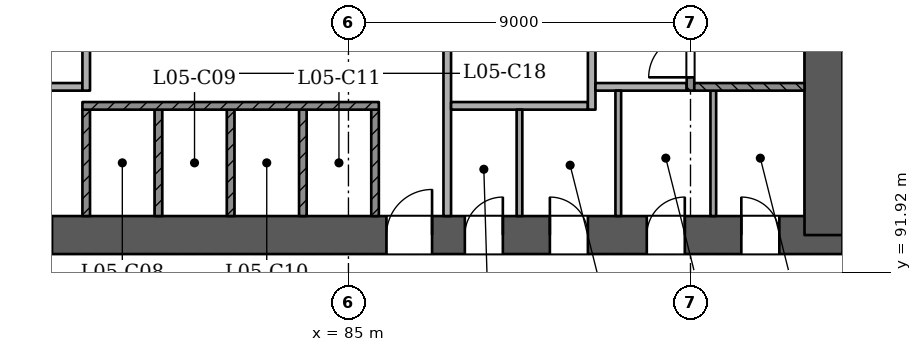
"""IFC4 building model, lengths in metres.
Left out: names, types, materials, properties, quantities, classifications, styles, units other than length and angle.
Written with IfcOpenShell. Run it as: python <this file> out.ifc"""

import sys

from ifc_helpers import new_model, si_unit, direction, frame, frame_2d, origin, place, context, subcontext, project, spatial, rectangle, extrude, element, fill, save


model = new_model("IFC4")
c1 = context("Model", 3, precision=1e-05, world=origin(), true_north=direction((0.0, 1.0)))
c2 = subcontext(c1, "Body", "Model", "MODEL_VIEW")
j1 = project(units=[si_unit("LENGTHUNIT", "METRE"), si_unit("PLANEANGLEUNIT", "RADIAN")], contexts=[c1])
p1 = place(None, origin())
s1 = spatial("IfcSite", under=j1, at=p1, CompositionType="ELEMENT")
p2 = place(p1, origin())
s2 = spatial("IfcBuilding", under=s1, at=p2, CompositionType="ELEMENT")
p3 = place(p2, frame((0.0, 0.0, 27.0)))
s3 = spatial("IfcBuildingStorey", under=s2, at=p3, CompositionType="ELEMENT", Elevation=27.0)
p4 = place(p3, frame((72.5, 92.9, 0.0), z_axis=(0.0, 0.0, 1.0), x_axis=(1.0, 0.0, 0.0)))
e1 = element("IfcWall", 1, at=p4, inside=s3, PredefinedType="SHEAR", context=c2, shape_type="SweptSolid", body=[
    extrude(rectangle(XDim=25.5, YDim=1.0, at=frame_2d((12.75, 0.0))), origin(), (0.0, 0.0, 1.0), 3.6),
])
p5 = place(p4, frame((1.3, 0.0, 0.0)))
e2 = element("IfcOpeningElement", 2, at=p5, cuts=e1, PredefinedType="OPENING", context=c2, shape_type="SweptSolid", body=[
    extrude(rectangle(XDim=1.2, YDim=2.1, at=frame_2d((0.6, 1.05))), frame((0.0, 0.51, 0.0), z_axis=(0.0, -1.0, 0.0), x_axis=(1.0, 0.0, 0.0)), (0.0, 0.0, 1.0), 1.021),
])
p6 = place(p4, frame((3.5, 0.0, 0.0)))
e3 = element("IfcOpeningElement", 3, at=p6, cuts=e1, PredefinedType="OPENING", context=c2, shape_type="SweptSolid", body=[
    extrude(rectangle(XDim=1.2, YDim=2.1, at=frame_2d((0.6, 1.05))), frame((0.0, 0.51, 0.0), z_axis=(0.0, -1.0, 0.0), x_axis=(1.0, 0.0, 0.0)), (0.0, 0.0, 1.0), 1.021),
])
p7 = place(p4, frame((13.5, 0.0, 0.0)))
e4 = element("IfcOpeningElement", 4, at=p7, cuts=e1, PredefinedType="OPENING", context=c2, shape_type="SweptSolid", body=[
    extrude(rectangle(XDim=1.2, YDim=2.1, at=frame_2d((0.6, 1.05))), frame((0.0, 0.51, 0.0), z_axis=(0.0, -1.0, 0.0), x_axis=(1.0, 0.0, 0.0)), (0.0, 0.0, 1.0), 1.021),
])
p8 = place(p4, frame((15.562, 0.0, 0.0)))
e5 = element("IfcOpeningElement", 5, at=p8, cuts=e1, PredefinedType="OPENING", context=c2, shape_type="SweptSolid", body=[
    extrude(rectangle(XDim=1.0, YDim=2.1, at=frame_2d((0.5, 1.05))), frame((0.0, 0.51, 0.0), z_axis=(0.0, -1.0, 0.0), x_axis=(1.0, 0.0, 0.0)), (0.0, 0.0, 1.0), 1.021),
])
p9 = place(p4, frame((17.8, 0.0, 0.0)))
e6 = element("IfcOpeningElement", 6, at=p9, cuts=e1, PredefinedType="OPENING", context=c2, shape_type="SweptSolid", body=[
    extrude(rectangle(XDim=1.0, YDim=2.1, at=frame_2d((0.5, 1.05))), frame((0.0, 0.51, 0.0), z_axis=(0.0, -1.0, 0.0), x_axis=(1.0, 0.0, 0.0)), (0.0, 0.0, 1.0), 1.021),
])
p10 = place(p4, frame((20.35, 0.0, 0.0)))
e7 = element("IfcOpeningElement", 7, at=p10, cuts=e1, PredefinedType="OPENING", context=c2, shape_type="SweptSolid", body=[
    extrude(rectangle(XDim=1.0, YDim=2.1, at=frame_2d((0.5, 1.05))), frame((0.0, 0.51, 0.0), z_axis=(0.0, -1.0, 0.0), x_axis=(1.0, 0.0, 0.0)), (0.0, 0.0, 1.0), 1.021),
])
p11 = place(p4, frame((22.837, 0.0, 0.0)))
e8 = element("IfcOpeningElement", 8, at=p11, cuts=e1, PredefinedType="OPENING", context=c2, shape_type="SweptSolid", body=[
    extrude(rectangle(XDim=1.0, YDim=2.1, at=frame_2d((0.5, 1.05))), frame((0.0, 0.51, 0.0), z_axis=(0.0, -1.0, 0.0), x_axis=(1.0, 0.0, 0.0)), (0.0, 0.0, 1.0), 1.021),
])
p12 = place(p3, frame((97.5, 92.9, 0.0), z_axis=(0.0, 0.0, 1.0), x_axis=(0.0, 1.0, 0.0)))
e9 = element("IfcWall", 9, at=p12, inside=s3, PredefinedType="SHEAR", context=c2, shape_type="SweptSolid", body=[
    extrude(rectangle(XDim=11.5, YDim=1.0, at=frame_2d((5.75, 0.0))), origin(), (0.0, 0.0, 1.0), 3.6),
])
p13 = place(p3, frame((61.193, 96.236, 0.0), z_axis=(0.0, 0.0, 1.0), x_axis=(0.49999953585, -0.866025671762, 0.0)))
e10 = element("IfcWall", 10, at=p13, inside=s3, PredefinedType="PARTITIONING", context=c2, shape_type="SweptSolid", body=[
    extrude(rectangle(XDim=45.0, YDim=0.15, at=frame_2d((22.5, 0.0))), origin(), (0.0, 0.0, 1.0), 2.7),
])
p14 = place(p13, frame((1.75, 0.0, 0.0)))
e11 = element("IfcOpeningElement", 11, at=p14, cuts=e10, PredefinedType="OPENING", context=c2, shape_type="SweptSolid", body=[
    extrude(rectangle(XDim=1.0, YDim=2.1, at=frame_2d((0.5, 1.05))), frame((0.0, 0.085, 0.0), z_axis=(0.0, -1.0, 0.0), x_axis=(1.0, 0.0, 0.0)), (0.0, 0.0, 1.0), 0.171),
])
p15 = place(p13, frame((7.3, 0.0, 0.0)))
e12 = element("IfcOpeningElement", 12, at=p15, cuts=e10, PredefinedType="OPENING", context=c2, shape_type="SweptSolid", body=[
    extrude(rectangle(XDim=1.2, YDim=2.1, at=frame_2d((0.6, 1.05))), frame((0.0, 0.085, 0.0), z_axis=(0.0, -1.0, 0.0), x_axis=(1.0, 0.0, 0.0)), (0.0, 0.0, 1.0), 0.171),
])
p16 = place(p13, frame((14.071, 0.0, 0.0)))
e13 = element("IfcOpeningElement", 13, at=p16, cuts=e10, PredefinedType="OPENING", context=c2, shape_type="SweptSolid", body=[
    extrude(rectangle(XDim=1.1, YDim=2.1, at=frame_2d((0.55, 1.05))), frame((0.0, 0.085, 0.0), z_axis=(0.0, -1.0, 0.0), x_axis=(1.0, 0.0, 0.0)), (0.0, 0.0, 1.0), 0.171),
])
p17 = place(p13, frame((20.78, 0.0, 0.0)))
e14 = element("IfcOpeningElement", 14, at=p17, cuts=e10, PredefinedType="OPENING", context=c2, shape_type="SweptSolid", body=[
    extrude(rectangle(XDim=1.0, YDim=2.1, at=frame_2d((0.5, 1.05))), frame((0.0, 0.085, 0.0), z_axis=(0.0, -1.0, 0.0), x_axis=(1.0, 0.0, 0.0)), (0.0, 0.0, 1.0), 0.171),
])
p18 = place(p13, frame((23.105, 0.0, 0.0)))
e15 = element("IfcOpeningElement", 15, at=p18, cuts=e10, PredefinedType="OPENING", context=c2, shape_type="SweptSolid", body=[
    extrude(rectangle(XDim=1.0, YDim=2.1, at=frame_2d((0.5, 1.05))), frame((0.0, 0.085, 0.0), z_axis=(0.0, -1.0, 0.0), x_axis=(1.0, 0.0, 0.0)), (0.0, 0.0, 1.0), 0.171),
])
p19 = place(p13, frame((28.75, 0.0, 0.0)))
e16 = element("IfcOpeningElement", 16, at=p19, cuts=e10, PredefinedType="OPENING", context=c2, shape_type="SweptSolid", body=[
    extrude(rectangle(XDim=1.0, YDim=2.1, at=frame_2d((0.5, 1.05))), frame((0.0, 0.085, 0.0), z_axis=(0.0, -1.0, 0.0), x_axis=(1.0, 0.0, 0.0)), (0.0, 0.0, 1.0), 0.171),
])
p20 = place(p13, frame((34.3, 0.0, 0.0)))
e17 = element("IfcOpeningElement", 17, at=p20, cuts=e10, PredefinedType="OPENING", context=c2, shape_type="SweptSolid", body=[
    extrude(rectangle(XDim=1.2, YDim=2.1, at=frame_2d((0.6, 1.05))), frame((0.0, 0.085, 0.0), z_axis=(0.0, -1.0, 0.0), x_axis=(1.0, 0.0, 0.0)), (0.0, 0.0, 1.0), 0.171),
])
p21 = place(p13, frame((43.28, 0.0, 0.0)))
e18 = element("IfcOpeningElement", 18, at=p21, cuts=e10, PredefinedType="OPENING", context=c2, shape_type="SweptSolid", body=[
    extrude(rectangle(XDim=1.0, YDim=2.1, at=frame_2d((0.5, 1.05))), frame((0.0, 0.085, 0.0), z_axis=(0.0, -1.0, 0.0), x_axis=(1.0, 0.0, 0.0)), (0.0, 0.0, 1.0), 0.171),
])
p22 = place(p3, frame((86.307, 57.264, 0.0), z_axis=(0.0, 0.0, 1.0), x_axis=(0.500000579958, 0.866025068945, 0.0)))
e19 = element("IfcWall", 19, at=p22, inside=s3, PredefinedType="PARTITIONING", context=c2, shape_type="SweptSolid", body=[
    extrude(rectangle(XDim=40.5, YDim=0.15, at=frame_2d((20.25, 0.0))), origin(), (0.0, 0.0, 1.0), 2.7),
])
p23 = place(p22, frame((0.72, 0.0, 0.0)))
e20 = element("IfcOpeningElement", 20, at=p23, cuts=e19, PredefinedType="OPENING", context=c2, shape_type="SweptSolid", body=[
    extrude(rectangle(XDim=1.0, YDim=2.1, at=frame_2d((0.5, 1.05))), frame((0.0, 0.085, 0.0), z_axis=(0.0, -1.0, 0.0), x_axis=(1.0, 0.0, 0.0)), (0.0, 0.0, 1.0), 0.171),
])
p24 = place(p22, frame((5.22, 0.0, 0.0)))
e21 = element("IfcOpeningElement", 21, at=p24, cuts=e19, PredefinedType="OPENING", context=c2, shape_type="SweptSolid", body=[
    extrude(rectangle(XDim=1.0, YDim=2.1, at=frame_2d((0.5, 1.05))), frame((0.0, 0.085, 0.0), z_axis=(0.0, -1.0, 0.0), x_axis=(1.0, 0.0, 0.0)), (0.0, 0.0, 1.0), 0.171),
])
p25 = place(p22, frame((11.78, 0.0, 0.0)))
e22 = element("IfcOpeningElement", 22, at=p25, cuts=e19, PredefinedType="OPENING", context=c2, shape_type="SweptSolid", body=[
    extrude(rectangle(XDim=1.0, YDim=2.1, at=frame_2d((0.5, 1.05))), frame((0.0, 0.085, 0.0), z_axis=(0.0, -1.0, 0.0), x_axis=(1.0, 0.0, 0.0)), (0.0, 0.0, 1.0), 0.171),
])
p26 = place(p22, frame((14.22, 0.0, 0.0)))
e23 = element("IfcOpeningElement", 23, at=p26, cuts=e19, PredefinedType="OPENING", context=c2, shape_type="SweptSolid", body=[
    extrude(rectangle(XDim=1.0, YDim=2.1, at=frame_2d((0.5, 1.05))), frame((0.0, 0.085, 0.0), z_axis=(0.0, -1.0, 0.0), x_axis=(1.0, 0.0, 0.0)), (0.0, 0.0, 1.0), 0.171),
])
p27 = place(p22, frame((19.75, 0.0, 0.0)))
e24 = element("IfcOpeningElement", 24, at=p27, cuts=e19, PredefinedType="OPENING", context=c2, shape_type="SweptSolid", body=[
    extrude(rectangle(XDim=1.0, YDim=2.1, at=frame_2d((0.5, 1.05))), frame((0.0, 0.085, 0.0), z_axis=(0.0, -1.0, 0.0), x_axis=(1.0, 0.0, 0.0)), (0.0, 0.0, 1.0), 0.171),
])
p28 = place(p22, frame((23.22, 0.0, 0.0)))
e25 = element("IfcOpeningElement", 25, at=p28, cuts=e19, PredefinedType="OPENING", context=c2, shape_type="SweptSolid", body=[
    extrude(rectangle(XDim=1.0, YDim=2.1, at=frame_2d((0.5, 1.05))), frame((0.0, 0.085, 0.0), z_axis=(0.0, -1.0, 0.0), x_axis=(1.0, 0.0, 0.0)), (0.0, 0.0, 1.0), 0.171),
])
p29 = place(p22, frame((29.895, 0.0, 0.0)))
e26 = element("IfcOpeningElement", 26, at=p29, cuts=e19, PredefinedType="OPENING", context=c2, shape_type="SweptSolid", body=[
    extrude(rectangle(XDim=1.0, YDim=2.1, at=frame_2d((0.5, 1.05))), frame((0.0, 0.085, 0.0), z_axis=(0.0, -1.0, 0.0), x_axis=(1.0, 0.0, 0.0)), (0.0, 0.0, 1.0), 0.171),
])
p30 = place(p22, frame((32.105, 0.0, 0.0)))
e27 = element("IfcOpeningElement", 27, at=p30, cuts=e19, PredefinedType="OPENING", context=c2, shape_type="SweptSolid", body=[
    extrude(rectangle(XDim=1.0, YDim=2.1, at=frame_2d((0.5, 1.05))), frame((0.0, 0.085, 0.0), z_axis=(0.0, -1.0, 0.0), x_axis=(1.0, 0.0, 0.0)), (0.0, 0.0, 1.0), 0.171),
])
p31 = place(p22, frame((38.78, 0.0, 0.0)))
e28 = element("IfcOpeningElement", 28, at=p31, cuts=e19, PredefinedType="OPENING", context=c2, shape_type="SweptSolid", body=[
    extrude(rectangle(XDim=1.0, YDim=2.1, at=frame_2d((0.5, 1.05))), frame((0.0, 0.085, 0.0), z_axis=(0.0, -1.0, 0.0), x_axis=(1.0, 0.0, 0.0)), (0.0, 0.0, 1.0), 0.171),
])
for number, where, z_axis, x_axis in (
    (29, (78.1, 93.4, 0.0), (0.0, 0.0, 1.0), (0.0, 1.0, 0.0)),
    (30, (80.0, 93.4, 0.0), (0.0, 0.0, 1.0), (0.0, 1.0, 0.0)),
    (31, (81.9, 93.4, 0.0), (0.0, 0.0, 1.0), (0.0, 1.0, 0.0)),
    (32, (83.8, 93.4, 0.0), (0.0, 0.0, 1.0), (0.0, 1.0, 0.0)),
    (33, (85.7, 93.4, 0.0), (0.0, 0.0, 1.0), (0.0, 1.0, 0.0)),
):
    element("IfcWall", number, at=place(p3, frame(where, z_axis=z_axis, x_axis=x_axis)), inside=s3, PredefinedType="SOLIDWALL", context=c2, shape_type="SweptSolid", body=[
        extrude(rectangle(XDim=2.8, YDim=0.2, at=frame_2d((1.4, 0.0))), origin(), (0.0, 0.0, 1.0), 3.1),
    ])
p32 = place(p3, frame((87.6, 93.4, 0.0), z_axis=(0.0, 0.0, 1.0), x_axis=(0.0, 1.0, 0.0)))
e34 = element("IfcWall", 34, at=p32, inside=s3, PredefinedType="PARTITIONING", context=c2, shape_type="SweptSolid", body=[
    extrude(rectangle(XDim=7.0, YDim=0.2, at=frame_2d((3.5, 0.0))), origin(), (0.0, 0.0, 1.0), 3.1),
])
p33 = place(p32, frame((4.45, 0.0, 0.0)))
e35 = element("IfcOpeningElement", 35, at=p33, cuts=e34, PredefinedType="OPENING", context=c2, shape_type="SweptSolid", body=[
    extrude(rectangle(XDim=1.1, YDim=2.1, at=frame_2d((0.55, 1.05))), frame((0.0, 0.11, 0.0), z_axis=(0.0, -1.0, 0.0), x_axis=(1.0, 0.0, 0.0)), (0.0, 0.0, 1.0), 0.221),
])
p34 = place(p3, frame((89.5, 93.4, 0.0), z_axis=(0.0, 0.0, 1.0), x_axis=(0.0, 1.0, 0.0)))
e36 = element("IfcWall", 36, at=p34, inside=s3, PredefinedType="PARTITIONING", context=c2, shape_type="SweptSolid", body=[
    extrude(rectangle(XDim=2.8, YDim=0.15, at=frame_2d((1.4, 0.0))), origin(), (0.0, 0.0, 1.0), 3.1),
])
for number, where, z_axis, x_axis in (
    (37, (92.1, 93.4, 0.0), (0.0, 0.0, 1.0), (0.0, 1.0, 0.0)),
    (38, (94.6, 93.4, 0.0), (0.0, 0.0, 1.0), (0.0, 1.0, 0.0)),
):
    element("IfcWall", number, at=place(p3, frame(where, z_axis=z_axis, x_axis=x_axis)), inside=s3, PredefinedType="PARTITIONING", context=c2, shape_type="SweptSolid", body=[
        extrude(rectangle(XDim=3.3, YDim=0.15, at=frame_2d((1.65, 0.0))), origin(), (0.0, 0.0, 1.0), 3.1),
    ])
p35 = place(p3, frame((78.0, 96.3, 0.0), z_axis=(0.0, 0.0, 1.0), x_axis=(1.0, 0.0, 0.0)))
e39 = element("IfcWall", 39, at=p35, inside=s3, PredefinedType="SOLIDWALL", context=c2, shape_type="SweptSolid", body=[
    extrude(rectangle(XDim=7.8, YDim=0.2, at=frame_2d((3.9, 0.0))), origin(), (0.0, 0.0, 1.0), 3.1),
])
p36 = place(p3, frame((87.7, 96.3, 0.0), z_axis=(0.0, 0.0, 1.0), x_axis=(1.0, 0.0, 0.0)))
e40 = element("IfcWall", 40, at=p36, inside=s3, PredefinedType="PARTITIONING", context=c2, shape_type="SweptSolid", body=[
    extrude(rectangle(XDim=3.6, YDim=0.2, at=frame_2d((1.8, 0.0))), origin(), (0.0, 0.0, 1.0), 3.1),
])
p37 = place(p3, frame((91.4, 96.2, 0.0), z_axis=(0.0, 0.0, 1.0), x_axis=(0.0, 1.0, 0.0)))
e41 = element("IfcWall", 41, at=p37, inside=s3, PredefinedType="PARTITIONING", context=c2, shape_type="SweptSolid", body=[
    extrude(rectangle(XDim=4.2, YDim=0.2, at=frame_2d((2.1, 0.0))), origin(), (0.0, 0.0, 1.0), 3.1),
])
p38 = place(p37, frame((2.45, 0.0, 0.0)))
e42 = element("IfcOpeningElement", 42, at=p38, cuts=e41, PredefinedType="OPENING", context=c2, shape_type="SweptSolid", body=[
    extrude(rectangle(XDim=1.1, YDim=2.1, at=frame_2d((0.55, 1.05))), frame((0.0, 0.11, 0.0), z_axis=(0.0, -1.0, 0.0), x_axis=(1.0, 0.0, 0.0)), (0.0, 0.0, 1.0), 0.221),
])
p39 = place(p3, frame((76.1, 96.8, 0.0), z_axis=(0.0, 0.0, 1.0), x_axis=(1.0, 0.0, 0.0)))
e43 = element("IfcWall", 43, at=p39, inside=s3, PredefinedType="PARTITIONING", context=c2, shape_type="SweptSolid", body=[
    extrude(rectangle(XDim=1.9, YDim=0.2, at=frame_2d((0.95, 0.0))), origin(), (0.0, 0.0, 1.0), 3.1),
])
p40 = place(p3, frame((78.1, 96.7, 0.0), z_axis=(0.0, 0.0, 1.0), x_axis=(0.0, 1.0, 0.0)))
e44 = element("IfcWall", 44, at=p40, inside=s3, PredefinedType="PARTITIONING", context=c2, shape_type="SweptSolid", body=[
    extrude(rectangle(XDim=3.7, YDim=0.2, at=frame_2d((1.85, 0.0))), origin(), (0.0, 0.0, 1.0), 3.1),
])
p41 = place(p40, frame((1.95, 0.0, 0.0)))
e45 = element("IfcOpeningElement", 45, at=p41, cuts=e44, PredefinedType="OPENING", context=c2, shape_type="SweptSolid", body=[
    extrude(rectangle(XDim=1.1, YDim=2.1, at=frame_2d((0.55, 1.05))), frame((0.0, 0.11, 0.0), z_axis=(0.0, -1.0, 0.0), x_axis=(1.0, 0.0, 0.0)), (0.0, 0.0, 1.0), 0.221),
])
p42 = place(p3, frame((91.5, 96.8, 0.0), z_axis=(0.0, 0.0, 1.0), x_axis=(1.0, 0.0, 0.0)))
e46 = element("IfcWall", 46, at=p42, inside=s3, PredefinedType="PARTITIONING", context=c2, shape_type="SweptSolid", body=[
    extrude(rectangle(XDim=2.4, YDim=0.2, at=frame_2d((1.2, 0.0))), origin(), (0.0, 0.0, 1.0), 3.1),
])
p43 = place(p3, frame((94.0, 96.7, 0.0), z_axis=(0.0, 0.0, 1.0), x_axis=(0.0, 1.0, 0.0)))
e47 = element("IfcWall", 47, at=p43, inside=s3, PredefinedType="SOLIDWALL", context=c2, shape_type="SweptSolid", body=[
    extrude(rectangle(XDim=3.7, YDim=0.2, at=frame_2d((1.85, 0.0))), origin(), (0.0, 0.0, 1.0), 3.1),
])
p44 = place(p43, frame((0.35, 0.0, 0.0)))
e48 = element("IfcOpeningElement", 48, at=p44, cuts=e47, PredefinedType="OPENING", context=c2, shape_type="SweptSolid", body=[
    extrude(rectangle(XDim=1.1, YDim=2.1, at=frame_2d((0.55, 1.05))), frame((0.0, 0.11, 0.0), z_axis=(0.0, -1.0, 0.0), x_axis=(1.0, 0.0, 0.0)), (0.0, 0.0, 1.0), 0.221),
])
p45 = place(p3, frame((94.1, 96.8, 0.0), z_axis=(0.0, 0.0, 1.0), x_axis=(1.0, 0.0, 0.0)))
e49 = element("IfcWall", 49, at=p45, inside=s3, PredefinedType="SOLIDWALL", context=c2, shape_type="SweptSolid", body=[
    extrude(rectangle(XDim=2.9, YDim=0.2, at=frame_2d((1.45, 0.0))), origin(), (0.0, 0.0, 1.0), 3.1),
])
p46 = place(p44, origin())
e50 = element("IfcDoor", 50, at=p46, inside=s3, OperationType="SINGLE_SWING_LEFT", PredefinedType="NOTDEFINED", context=c2, shape_type="SweptSolid", body=[
    extrude(rectangle(XDim=1.1, YDim=2.1, at=frame_2d((0.55, 1.05))), frame((0.0, 0.025, 0.0), z_axis=(0.0, -1.0, 0.0), x_axis=(1.0, 0.0, 0.0)), (0.0, 0.0, 1.0), 0.05),
])
fill(e48, e50)
p47 = place(p6, origin())
e51 = element("IfcDoor", 51, at=p47, inside=s3, OperationType="SINGLE_SWING_LEFT", PredefinedType="NOTDEFINED", context=c2, shape_type="SweptSolid", body=[
    extrude(rectangle(XDim=1.2, YDim=2.1, at=frame_2d((0.6, 1.05))), frame((0.0, 0.025, 0.0), z_axis=(0.0, -1.0, 0.0), x_axis=(1.0, 0.0, 0.0)), (0.0, 0.0, 1.0), 0.05),
])
fill(e3, e51)
p48 = place(p7, origin())
e52 = element("IfcDoor", 52, at=p48, inside=s3, OperationType="SINGLE_SWING_RIGHT", PredefinedType="NOTDEFINED", context=c2, shape_type="SweptSolid", body=[
    extrude(rectangle(XDim=1.2, YDim=2.1, at=frame_2d((0.6, 1.05))), frame((0.0, 0.025, 0.0), z_axis=(0.0, -1.0, 0.0), x_axis=(1.0, 0.0, 0.0)), (0.0, 0.0, 1.0), 0.05),
])
fill(e4, e52)
p49 = place(p8, origin())
e53 = element("IfcDoor", 53, at=p49, inside=s3, OperationType="SINGLE_SWING_RIGHT", PredefinedType="NOTDEFINED", context=c2, shape_type="SweptSolid", body=[
    extrude(rectangle(XDim=1.0, YDim=2.1, at=frame_2d((0.5, 1.05))), frame((0.0, 0.025, 0.0), z_axis=(0.0, -1.0, 0.0), x_axis=(1.0, 0.0, 0.0)), (0.0, 0.0, 1.0), 0.05),
])
fill(e5, e53)
p50 = place(p9, origin())
e54 = element("IfcDoor", 54, at=p50, inside=s3, OperationType="SINGLE_SWING_LEFT", PredefinedType="NOTDEFINED", context=c2, shape_type="SweptSolid", body=[
    extrude(rectangle(XDim=1.0, YDim=2.1, at=frame_2d((0.5, 1.05))), frame((0.0, 0.025, 0.0), z_axis=(0.0, -1.0, 0.0), x_axis=(1.0, 0.0, 0.0)), (0.0, 0.0, 1.0), 0.05),
])
fill(e6, e54)
p51 = place(p10, origin())
e55 = element("IfcDoor", 55, at=p51, inside=s3, OperationType="SINGLE_SWING_RIGHT", PredefinedType="NOTDEFINED", context=c2, shape_type="SweptSolid", body=[
    extrude(rectangle(XDim=1.0, YDim=2.1, at=frame_2d((0.5, 1.05))), frame((0.0, 0.025, 0.0), z_axis=(0.0, -1.0, 0.0), x_axis=(1.0, 0.0, 0.0)), (0.0, 0.0, 1.0), 0.05),
])
fill(e7, e55)
p52 = place(p11, origin())
e56 = element("IfcDoor", 56, at=p52, inside=s3, OperationType="SINGLE_SWING_LEFT", PredefinedType="NOTDEFINED", context=c2, shape_type="SweptSolid", body=[
    extrude(rectangle(XDim=1.0, YDim=2.1, at=frame_2d((0.5, 1.05))), frame((0.0, 0.025, 0.0), z_axis=(0.0, -1.0, 0.0), x_axis=(1.0, 0.0, 0.0)), (0.0, 0.0, 1.0), 0.05),
])
fill(e8, e56)
save(model, sys.argv[1])
